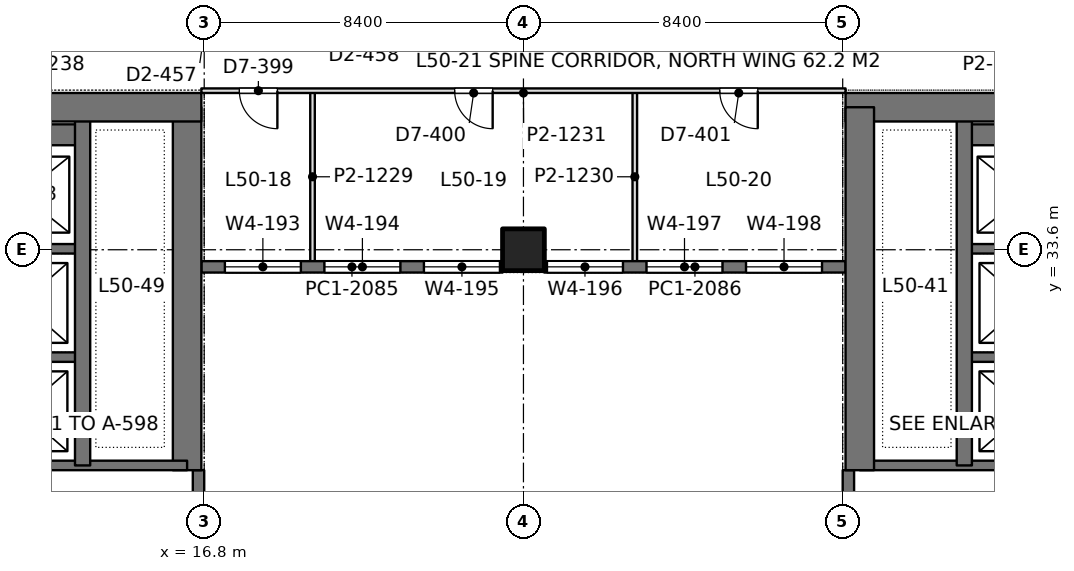
"""IFC4 building model, lengths in metres.
Left out: names, types, materials, properties, quantities, classifications, styles, units other than length and angle.
Written with IfcOpenShell. Run it as: python <this file> out.ifc"""

import sys

from ifc_helpers import new_model, si_unit, direction, frame, frame_2d, origin, origin_2d, place, context, subcontext, project, spatial, rectangle, extrude, element, fill, save


model = new_model("IFC4")
c1 = context("Model", 3, precision=1e-05, world=origin(), true_north=direction((0.0, 1.0)))
c2 = subcontext(c1, "Body", "Model", "MODEL_VIEW")
j1 = project(units=[si_unit("LENGTHUNIT", "METRE"), si_unit("PLANEANGLEUNIT", "RADIAN")], contexts=[c1])
p1 = place(None, origin())
s1 = spatial("IfcSite", under=j1, at=p1, CompositionType="ELEMENT")
p2 = place(p1, origin())
s2 = spatial("IfcBuilding", under=s1, at=p2, CompositionType="ELEMENT")
p3 = place(p2, frame((0.0, 0.0, 219.6)))
s3 = spatial("IfcBuildingStorey", under=s2, at=p3, CompositionType="ELEMENT", Elevation=219.6)
p4 = place(p3, frame((25.2, 33.6, 0.0), z_axis=(0.0, 0.0, 1.0), x_axis=(1.0, 0.0, 0.0)))
e1 = element("IfcColumn", 1, at=p4, inside=s3, PredefinedType="COLUMN", context=c2, shape_type="SweptSolid", body=[
    extrude(rectangle(XDim=1.1, YDim=1.1, at=origin_2d()), origin(), (0.0, 0.0, 1.0), 4.2),
])
p5 = place(p3, frame((-1.125, 37.35, 0.0), z_axis=(0.0, 0.0, 1.0), x_axis=(1.0, 0.0, 0.0)))
e2 = element("IfcWall", 2, at=p5, inside=s3, PredefinedType="SHEAR", context=c2, shape_type="SweptSolid", body=[
    extrude(rectangle(XDim=17.85, YDim=0.75, at=frame_2d((8.925, 0.0))), origin(), (0.0, 0.0, 1.0), 4.2),
])
p6 = place(p5, frame((8.875, 0.0, 0.0)))
e3 = element("IfcOpeningElement", 3, at=p6, cuts=e2, PredefinedType="OPENING", context=c2, shape_type="SweptSolid", body=[
    extrude(rectangle(XDim=1.8, YDim=2.4, at=frame_2d((0.9, 1.2))), frame((0.0, 0.385, 0.0), z_axis=(0.0, -1.0, 0.0), x_axis=(1.0, 0.0, 0.0)), (0.0, 0.0, 1.0), 0.77),
])
p7 = place(p3, frame((16.35, 27.8, 0.0), z_axis=(0.0, 0.0, 1.0), x_axis=(0.0, 1.0, 0.0)))
e4 = element("IfcWall", 4, at=p7, inside=s3, PredefinedType="SHEAR", context=c2, shape_type="SweptSolid", body=[
    extrude(rectangle(XDim=9.55, YDim=0.75, at=frame_2d((4.775, 0.0))), origin(), (0.0, 0.0, 1.0), 4.2),
])
p8 = place(p3, frame((13.6, 27.925, 0.0), z_axis=(0.0, 0.0, 1.0), x_axis=(0.0, 1.0, 0.0)))
e5 = element("IfcWall", 5, at=p8, inside=s3, PredefinedType="SHEAR", context=c2, shape_type="SweptSolid", body=[
    extrude(rectangle(XDim=9.425, YDim=0.4, at=frame_2d((4.712, 0.0))), origin(), (0.0, 0.0, 1.0), 4.2),
])
p9 = place(p3, frame((10.4, 27.925, 0.0), z_axis=(0.0, 0.0, 1.0), x_axis=(1.0, 0.0, 0.0)))
e6 = element("IfcWall", 6, at=p9, inside=s3, PredefinedType="SHEAR", context=c2, shape_type="SweptSolid", body=[
    extrude(rectangle(XDim=5.95, YDim=0.25, at=frame_2d((2.975, 0.0))), origin(), (0.0, 0.0, 1.0), 4.2),
])
for number, where, z_axis, x_axis in (
    (7, (10.4, 30.775, 0.0), (0.0, 0.0, 1.0), (1.0, 0.0, 0.0)),
    (8, (10.4, 33.625, 0.0), (0.0, 0.0, 1.0), (1.0, 0.0, 0.0)),
):
    element("IfcWall", number, at=place(p3, frame(where, z_axis=z_axis, x_axis=x_axis)), inside=s3, PredefinedType="SHEAR", context=c2, shape_type="SweptSolid", body=[
        extrude(rectangle(XDim=3.2, YDim=0.25, at=frame_2d((1.6, 0.0))), origin(), (0.0, 0.0, 1.0), 4.2),
    ])
p10 = place(p3, frame((10.4, 36.625, 0.0), z_axis=(0.0, 0.0, 1.0), x_axis=(1.0, 0.0, 0.0)))
e9 = element("IfcWall", 9, at=p10, inside=s3, PredefinedType="SHEAR", context=c2, shape_type="SweptSolid", body=[
    extrude(rectangle(XDim=3.2, YDim=0.55, at=frame_2d((1.6, 0.0))), origin(), (0.0, 0.0, 1.0), 4.2),
])
p11 = place(p3, frame((33.675, 37.35, 0.0), z_axis=(0.0, 0.0, 1.0), x_axis=(1.0, 0.0, 0.0)))
e10 = element("IfcWall", 10, at=p11, inside=s3, PredefinedType="SHEAR", context=c2, shape_type="SweptSolid", body=[
    extrude(rectangle(XDim=17.85, YDim=0.75, at=frame_2d((8.925, 0.0))), origin(), (0.0, 0.0, 1.0), 4.2),
])
p12 = place(p11, frame((7.175, 0.0, 0.0)))
e11 = element("IfcOpeningElement", 11, at=p12, cuts=e10, PredefinedType="OPENING", context=c2, shape_type="SweptSolid", body=[
    extrude(rectangle(XDim=1.8, YDim=2.4, at=frame_2d((0.9, 1.2))), frame((0.0, 0.385, 0.0), z_axis=(0.0, -1.0, 0.0), x_axis=(1.0, 0.0, 0.0)), (0.0, 0.0, 1.0), 0.77),
])
p13 = place(p3, frame((34.05, 27.8, 0.0), z_axis=(0.0, 0.0, 1.0), x_axis=(0.0, 1.0, 0.0)))
e12 = element("IfcWall", 12, at=p13, inside=s3, PredefinedType="SHEAR", context=c2, shape_type="SweptSolid", body=[
    extrude(rectangle(XDim=9.55, YDim=0.75, at=frame_2d((4.775, 0.0))), origin(), (0.0, 0.0, 1.0), 4.2),
])
p14 = place(p3, frame((36.8, 27.925, 0.0), z_axis=(0.0, 0.0, 1.0), x_axis=(0.0, 1.0, 0.0)))
e13 = element("IfcWall", 13, at=p14, inside=s3, PredefinedType="SHEAR", context=c2, shape_type="SweptSolid", body=[
    extrude(rectangle(XDim=9.425, YDim=0.4, at=frame_2d((4.712, 0.0))), origin(), (0.0, 0.0, 1.0), 4.2),
])
p15 = place(p3, frame((40.0, 27.925, 0.0), z_axis=(0.0, 0.0, 1.0), x_axis=(-1.0, 0.0, 0.0)))
e14 = element("IfcWall", 14, at=p15, inside=s3, PredefinedType="SHEAR", context=c2, shape_type="SweptSolid", body=[
    extrude(rectangle(XDim=5.95, YDim=0.25, at=frame_2d((2.975, 0.0))), origin(), (0.0, 0.0, 1.0), 4.2),
])
for number, where, z_axis, x_axis in (
    (15, (40.0, 30.775, 0.0), (0.0, 0.0, 1.0), (-1.0, 0.0, 0.0)),
    (16, (40.0, 33.625, 0.0), (0.0, 0.0, 1.0), (-1.0, 0.0, 0.0)),
):
    element("IfcWall", number, at=place(p3, frame(where, z_axis=z_axis, x_axis=x_axis)), inside=s3, PredefinedType="SHEAR", context=c2, shape_type="SweptSolid", body=[
        extrude(rectangle(XDim=3.2, YDim=0.25, at=frame_2d((1.6, 0.0))), origin(), (0.0, 0.0, 1.0), 4.2),
    ])
p16 = place(p3, frame((40.0, 36.625, 0.0), z_axis=(0.0, 0.0, 1.0), x_axis=(-1.0, 0.0, 0.0)))
e17 = element("IfcWall", 17, at=p16, inside=s3, PredefinedType="SHEAR", context=c2, shape_type="SweptSolid", body=[
    extrude(rectangle(XDim=3.2, YDim=0.55, at=frame_2d((1.6, 0.0))), origin(), (0.0, 0.0, 1.0), 4.2),
])
p17 = place(p3, frame((16.65, 17.1, 0.0), z_axis=(0.0, 0.0, 1.0), x_axis=(0.0, 1.0, 0.0)))
e18 = element("IfcWall", 18, at=p17, inside=s3, PredefinedType="SOLIDWALL", context=c2, shape_type="SweptSolid", body=[
    extrude(rectangle(XDim=10.7, YDim=0.3, at=frame_2d((5.35, 0.0))), origin(), (0.0, 0.0, 1.0), 4.05),
])
p18 = place(p17, frame((0.55, 0.0, 0.9)))
e19 = element("IfcOpeningElement", 19, at=p18, cuts=e18, PredefinedType="OPENING", context=c2, shape_type="SweptSolid", body=[
    extrude(rectangle(XDim=2.0, YDim=1.9, at=frame_2d((1.0, 0.95))), frame((0.0, 0.16, 0.0), z_axis=(0.0, -1.0, 0.0), x_axis=(1.0, 0.0, 0.0)), (0.0, 0.0, 1.0), 0.32),
])
p19 = place(p17, frame((2.9, 0.0, 0.9)))
e20 = element("IfcOpeningElement", 20, at=p19, cuts=e18, PredefinedType="OPENING", context=c2, shape_type="SweptSolid", body=[
    extrude(rectangle(XDim=2.0, YDim=1.9, at=frame_2d((1.0, 0.95))), frame((0.0, 0.16, 0.0), z_axis=(0.0, -1.0, 0.0), x_axis=(1.0, 0.0, 0.0)), (0.0, 0.0, 1.0), 0.32),
])
p20 = place(p17, frame((7.675, 0.0, 0.9)))
e21 = element("IfcOpeningElement", 21, at=p20, cuts=e18, PredefinedType="OPENING", context=c2, shape_type="SweptSolid", body=[
    extrude(rectangle(XDim=2.0, YDim=1.9, at=frame_2d((1.0, 0.95))), frame((0.0, 0.16, 0.0), z_axis=(0.0, -1.0, 0.0), x_axis=(1.0, 0.0, 0.0)), (0.0, 0.0, 1.0), 0.32),
])
p21 = place(p3, frame((33.75, 17.1, 0.0), z_axis=(0.0, 0.0, 1.0), x_axis=(0.0, 1.0, 0.0)))
e22 = element("IfcWall", 22, at=p21, inside=s3, PredefinedType="SOLIDWALL", context=c2, shape_type="SweptSolid", body=[
    extrude(rectangle(XDim=10.7, YDim=0.3, at=frame_2d((5.35, 0.0))), origin(), (0.0, 0.0, 1.0), 4.05),
])
p22 = place(p21, frame((0.55, 0.0, 0.9)))
e23 = element("IfcOpeningElement", 23, at=p22, cuts=e22, PredefinedType="OPENING", context=c2, shape_type="SweptSolid", body=[
    extrude(rectangle(XDim=2.0, YDim=1.9, at=frame_2d((1.0, 0.95))), frame((0.0, 0.16, 0.0), z_axis=(0.0, -1.0, 0.0), x_axis=(1.0, 0.0, 0.0)), (0.0, 0.0, 1.0), 0.32),
])
p23 = place(p21, frame((2.9, 0.0, 0.9)))
e24 = element("IfcOpeningElement", 24, at=p23, cuts=e22, PredefinedType="OPENING", context=c2, shape_type="SweptSolid", body=[
    extrude(rectangle(XDim=2.0, YDim=1.9, at=frame_2d((1.0, 0.95))), frame((0.0, 0.16, 0.0), z_axis=(0.0, -1.0, 0.0), x_axis=(1.0, 0.0, 0.0)), (0.0, 0.0, 1.0), 0.32),
])
p24 = place(p21, frame((7.675, 0.0, 0.9)))
e25 = element("IfcOpeningElement", 25, at=p24, cuts=e22, PredefinedType="OPENING", context=c2, shape_type="SweptSolid", body=[
    extrude(rectangle(XDim=2.0, YDim=1.9, at=frame_2d((1.0, 0.95))), frame((0.0, 0.16, 0.0), z_axis=(0.0, -1.0, 0.0), x_axis=(1.0, 0.0, 0.0)), (0.0, 0.0, 1.0), 0.32),
])
p25 = place(p3, frame((16.725, 33.15, 0.0), z_axis=(0.0, 0.0, 1.0), x_axis=(1.0, 0.0, 0.0)))
e26 = element("IfcWall", 26, at=p25, inside=s3, PredefinedType="SOLIDWALL", context=c2, shape_type="SweptSolid", body=[
    extrude(rectangle(XDim=7.925, YDim=0.3, at=frame_2d((3.962, 0.0))), origin(), (0.0, 0.0, 1.0), 4.05),
])
p26 = place(p25, frame((0.619, 0.0, 0.9)))
e27 = element("IfcOpeningElement", 27, at=p26, cuts=e26, PredefinedType="OPENING", context=c2, shape_type="SweptSolid", body=[
    extrude(rectangle(XDim=2.0, YDim=1.9, at=frame_2d((1.0, 0.95))), frame((0.0, 0.16, 0.0), z_axis=(0.0, -1.0, 0.0), x_axis=(1.0, 0.0, 0.0)), (0.0, 0.0, 1.0), 0.32),
])
p27 = place(p25, frame((3.238, 0.0, 0.9)))
e28 = element("IfcOpeningElement", 28, at=p27, cuts=e26, PredefinedType="OPENING", context=c2, shape_type="SweptSolid", body=[
    extrude(rectangle(XDim=2.0, YDim=1.9, at=frame_2d((1.0, 0.95))), frame((0.0, 0.16, 0.0), z_axis=(0.0, -1.0, 0.0), x_axis=(1.0, 0.0, 0.0)), (0.0, 0.0, 1.0), 0.32),
])
p28 = place(p25, frame((5.856, 0.0, 0.9)))
e29 = element("IfcOpeningElement", 29, at=p28, cuts=e26, PredefinedType="OPENING", context=c2, shape_type="SweptSolid", body=[
    extrude(rectangle(XDim=2.0, YDim=1.9, at=frame_2d((1.0, 0.95))), frame((0.0, 0.16, 0.0), z_axis=(0.0, -1.0, 0.0), x_axis=(1.0, 0.0, 0.0)), (0.0, 0.0, 1.0), 0.32),
])
p29 = place(p3, frame((25.75, 33.15, 0.0), z_axis=(0.0, 0.0, 1.0), x_axis=(1.0, 0.0, 0.0)))
e30 = element("IfcWall", 30, at=p29, inside=s3, PredefinedType="SOLIDWALL", context=c2, shape_type="SweptSolid", body=[
    extrude(rectangle(XDim=7.925, YDim=0.3, at=frame_2d((3.962, 0.0))), origin(), (0.0, 0.0, 1.0), 4.05),
])
p30 = place(p29, frame((0.069, 0.0, 0.9)))
e31 = element("IfcOpeningElement", 31, at=p30, cuts=e30, PredefinedType="OPENING", context=c2, shape_type="SweptSolid", body=[
    extrude(rectangle(XDim=2.0, YDim=1.9, at=frame_2d((1.0, 0.95))), frame((0.0, 0.16, 0.0), z_axis=(0.0, -1.0, 0.0), x_axis=(1.0, 0.0, 0.0)), (0.0, 0.0, 1.0), 0.32),
])
p31 = place(p29, frame((2.688, 0.0, 0.9)))
e32 = element("IfcOpeningElement", 32, at=p31, cuts=e30, PredefinedType="OPENING", context=c2, shape_type="SweptSolid", body=[
    extrude(rectangle(XDim=2.0, YDim=1.9, at=frame_2d((1.0, 0.95))), frame((0.0, 0.16, 0.0), z_axis=(0.0, -1.0, 0.0), x_axis=(1.0, 0.0, 0.0)), (0.0, 0.0, 1.0), 0.32),
])
p32 = place(p29, frame((5.306, 0.0, 0.9)))
e33 = element("IfcOpeningElement", 33, at=p32, cuts=e30, PredefinedType="OPENING", context=c2, shape_type="SweptSolid", body=[
    extrude(rectangle(XDim=2.0, YDim=1.9, at=frame_2d((1.0, 0.95))), frame((0.0, 0.16, 0.0), z_axis=(0.0, -1.0, 0.0), x_axis=(1.0, 0.0, 0.0)), (0.0, 0.0, 1.0), 0.32),
])
for number, where, z_axis, x_axis in (
    (34, (19.65, 33.298, 0.0), (0.0, 0.0, 1.0), (0.0, 1.0, 0.0)),
    (35, (28.13, 33.298, 0.0), (0.0, 0.0, 1.0), (0.0, 1.0, 0.0)),
):
    element("IfcWall", number, at=place(p3, frame(where, z_axis=z_axis, x_axis=x_axis)), inside=s3, PredefinedType="PARTITIONING", context=c2, shape_type="SweptSolid", body=[
        extrude(rectangle(XDim=4.444, YDim=0.12, at=frame_2d((2.222, 0.0))), origin(), (0.0, 0.0, 1.0), 3.36),
    ])
p33 = place(p3, frame((16.725, 37.785, 0.0), z_axis=(0.0, 0.0, 1.0), x_axis=(1.0, 0.0, 0.0)))
e36 = element("IfcWall", 36, at=p33, inside=s3, PredefinedType="PARTITIONING", context=c2, shape_type="SweptSolid", body=[
    extrude(rectangle(XDim=16.95, YDim=0.12, at=frame_2d((8.475, 0.0))), origin(), (0.0, 0.0, 1.0), 3.55),
])
p34 = place(p33, frame((1.0, 0.0, 0.0)))
e37 = element("IfcOpeningElement", 37, at=p34, cuts=e36, PredefinedType="OPENING", context=c2, shape_type="SweptSolid", body=[
    extrude(rectangle(XDim=1.0, YDim=2.4, at=frame_2d((0.5, 1.2))), frame((0.0, 0.07, 0.0), z_axis=(0.0, -1.0, 0.0), x_axis=(1.0, 0.0, 0.0)), (0.0, 0.0, 1.0), 0.14),
])
p35 = place(p33, frame((6.665, 0.0, 0.0)))
e38 = element("IfcOpeningElement", 38, at=p35, cuts=e36, PredefinedType="OPENING", context=c2, shape_type="SweptSolid", body=[
    extrude(rectangle(XDim=1.0, YDim=2.4, at=frame_2d((0.5, 1.2))), frame((0.0, 0.07, 0.0), z_axis=(0.0, -1.0, 0.0), x_axis=(1.0, 0.0, 0.0)), (0.0, 0.0, 1.0), 0.14),
])
p36 = place(p33, frame((13.64, 0.0, 0.0)))
e39 = element("IfcOpeningElement", 39, at=p36, cuts=e36, PredefinedType="OPENING", context=c2, shape_type="SweptSolid", body=[
    extrude(rectangle(XDim=1.0, YDim=2.4, at=frame_2d((0.5, 1.2))), frame((0.0, 0.07, 0.0), z_axis=(0.0, -1.0, 0.0), x_axis=(1.0, 0.0, 0.0)), (0.0, 0.0, 1.0), 0.14),
])
p37 = place(p26, origin())
e40 = element("IfcWindow", 40, at=p37, inside=s3, PartitioningType="SINGLE_PANEL", PredefinedType="WINDOW", context=c2, shape_type="SweptSolid", body=[
    extrude(rectangle(XDim=2.0, YDim=1.9, at=frame_2d((1.0, 0.95))), frame((0.0, 0.03, 0.0), z_axis=(0.0, -1.0, 0.0), x_axis=(1.0, 0.0, 0.0)), (0.0, 0.0, 1.0), 0.06),
])
fill(e27, e40)
p38 = place(p27, origin())
e41 = element("IfcWindow", 41, at=p38, inside=s3, PartitioningType="SINGLE_PANEL", PredefinedType="WINDOW", context=c2, shape_type="SweptSolid", body=[
    extrude(rectangle(XDim=2.0, YDim=1.9, at=frame_2d((1.0, 0.95))), frame((0.0, 0.03, 0.0), z_axis=(0.0, -1.0, 0.0), x_axis=(1.0, 0.0, 0.0)), (0.0, 0.0, 1.0), 0.06),
])
fill(e28, e41)
p39 = place(p28, origin())
e42 = element("IfcWindow", 42, at=p39, inside=s3, PartitioningType="SINGLE_PANEL", PredefinedType="WINDOW", context=c2, shape_type="SweptSolid", body=[
    extrude(rectangle(XDim=2.0, YDim=1.9, at=frame_2d((1.0, 0.95))), frame((0.0, 0.03, 0.0), z_axis=(0.0, -1.0, 0.0), x_axis=(1.0, 0.0, 0.0)), (0.0, 0.0, 1.0), 0.06),
])
fill(e29, e42)
p40 = place(p30, origin())
e43 = element("IfcWindow", 43, at=p40, inside=s3, PartitioningType="SINGLE_PANEL", PredefinedType="WINDOW", context=c2, shape_type="SweptSolid", body=[
    extrude(rectangle(XDim=2.0, YDim=1.9, at=frame_2d((1.0, 0.95))), frame((0.0, 0.03, 0.0), z_axis=(0.0, -1.0, 0.0), x_axis=(1.0, 0.0, 0.0)), (0.0, 0.0, 1.0), 0.06),
])
fill(e31, e43)
p41 = place(p31, origin())
e44 = element("IfcWindow", 44, at=p41, inside=s3, PartitioningType="SINGLE_PANEL", PredefinedType="WINDOW", context=c2, shape_type="SweptSolid", body=[
    extrude(rectangle(XDim=2.0, YDim=1.9, at=frame_2d((1.0, 0.95))), frame((0.0, 0.03, 0.0), z_axis=(0.0, -1.0, 0.0), x_axis=(1.0, 0.0, 0.0)), (0.0, 0.0, 1.0), 0.06),
])
fill(e32, e44)
p42 = place(p32, origin())
e45 = element("IfcWindow", 45, at=p42, inside=s3, PartitioningType="SINGLE_PANEL", PredefinedType="WINDOW", context=c2, shape_type="SweptSolid", body=[
    extrude(rectangle(XDim=2.0, YDim=1.9, at=frame_2d((1.0, 0.95))), frame((0.0, 0.03, 0.0), z_axis=(0.0, -1.0, 0.0), x_axis=(1.0, 0.0, 0.0)), (0.0, 0.0, 1.0), 0.06),
])
fill(e33, e45)
p43 = place(p34, frame((1.0, 0.0, 0.0), z_axis=(0.0, 0.0, 1.0), x_axis=(-1.0, 0.0, 0.0)))
e46 = element("IfcDoor", 46, at=p43, inside=s3, OperationType="SINGLE_SWING_LEFT", PredefinedType="DOOR", context=c2, shape_type="SweptSolid", body=[
    extrude(rectangle(XDim=1.0, YDim=2.4, at=frame_2d((0.5, 1.2))), frame((0.0, 0.025, 0.0), z_axis=(0.0, -1.0, 0.0), x_axis=(1.0, 0.0, 0.0)), (0.0, 0.0, 1.0), 0.05),
])
fill(e37, e46)
p44 = place(p35, frame((1.0, 0.0, 0.0), z_axis=(0.0, 0.0, 1.0), x_axis=(-1.0, 0.0, 0.0)))
e47 = element("IfcDoor", 47, at=p44, inside=s3, OperationType="SINGLE_SWING_LEFT", PredefinedType="DOOR", context=c2, shape_type="SweptSolid", body=[
    extrude(rectangle(XDim=1.0, YDim=2.4, at=frame_2d((0.5, 1.2))), frame((0.0, 0.025, 0.0), z_axis=(0.0, -1.0, 0.0), x_axis=(1.0, 0.0, 0.0)), (0.0, 0.0, 1.0), 0.05),
])
fill(e38, e47)
p45 = place(p36, frame((1.0, 0.0, 0.0), z_axis=(0.0, 0.0, 1.0), x_axis=(-1.0, 0.0, 0.0)))
e48 = element("IfcDoor", 48, at=p45, inside=s3, OperationType="SINGLE_SWING_LEFT", PredefinedType="DOOR", context=c2, shape_type="SweptSolid", body=[
    extrude(rectangle(XDim=1.0, YDim=2.4, at=frame_2d((0.5, 1.2))), frame((0.0, 0.025, 0.0), z_axis=(0.0, -1.0, 0.0), x_axis=(1.0, 0.0, 0.0)), (0.0, 0.0, 1.0), 0.05),
])
fill(e39, e48)
save(model, sys.argv[1])
